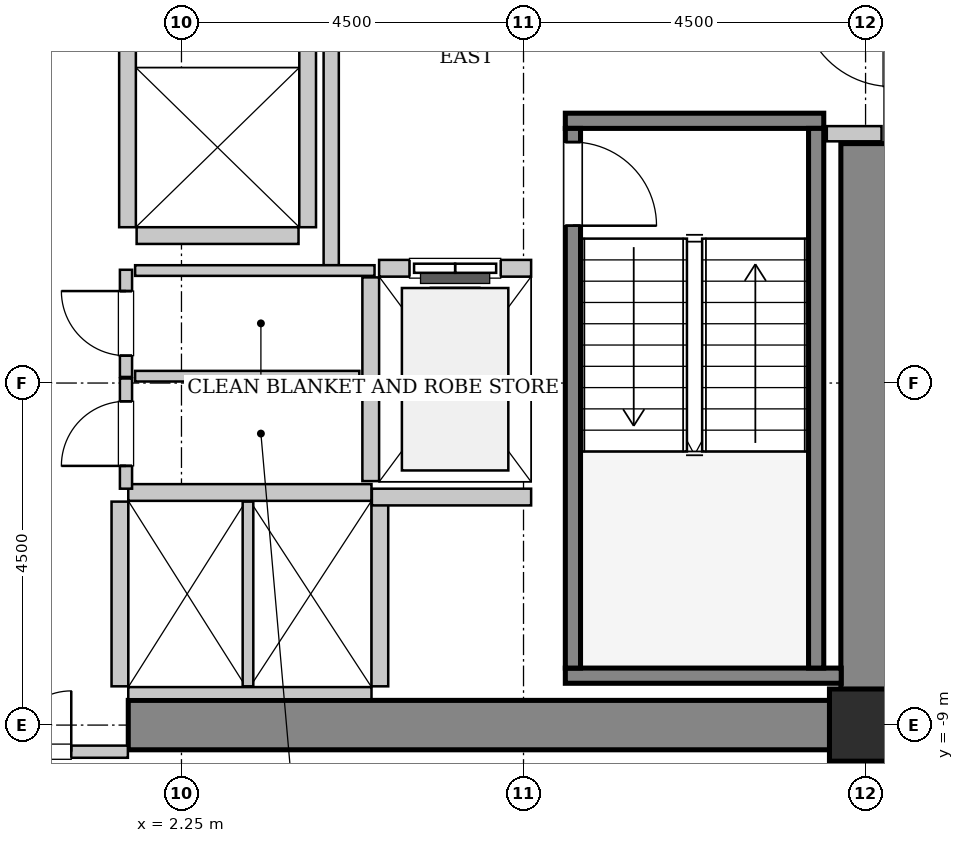
"""IFC4 building model, lengths in metres.
Left out: names, types, materials, properties, quantities, classifications, styles, units other than length and angle.
Written with IfcOpenShell. Run it as: python <this file> out.ifc"""

import sys

from ifc_helpers import new_model, si_unit, direction, frame, frame_2d, origin, origin_2d, place, context, subcontext, project, spatial, rectangle, hollow_rectangle, extrude, source, transform, mapped, element, fill, save


model = new_model("IFC4")
c1 = context("Model", 3, precision=1e-05, world=origin(), true_north=direction((0.0, 1.0)))
c2 = subcontext(c1, "Body", "Model", "MODEL_VIEW")
j1 = project(units=[si_unit("LENGTHUNIT", "METRE"), si_unit("PLANEANGLEUNIT", "RADIAN")], contexts=[c1])
p1 = place(None, origin())
s1 = spatial("IfcSite", under=j1, at=p1, CompositionType="ELEMENT")
p2 = place(p1, origin())
s2 = spatial("IfcBuilding", under=s1, at=p2, CompositionType="ELEMENT")
p3 = place(p2, frame((0.0, 0.0, 74.8)))
s3 = spatial("IfcBuildingStorey", under=s2, at=p3, CompositionType="ELEMENT", Elevation=74.8)
m1 = source(origin(), c2, "Body", "SweptSolid", [
    extrude(rectangle(XDim=10.025, YDim=0.65, at=frame_2d((5.012, 0.0))), origin(), (0.0, 0.0, 1.0), 3.8),
])
p4 = place(p3, frame((1.55, -9.0, 0.0), z_axis=(0.0, 0.0, 1.0), x_axis=(1.0, 0.0, 0.0)))
e1 = element("IfcWall", 1, at=p4, inside=s3, PredefinedType="SHEAR", context=c2, shape_type="MappedRepresentation", body=[
    mapped(m1, transform((0.0, 0.0, 0.0), x_axis=(1.0, 0.0, 0.0), y_axis=(0.0, 1.0, 0.0), z_axis=(0.0, 0.0, 1.0), scale=1.0)),
])
m2 = source(origin(), c2, "Body", "SweptSolid", [
    extrude(rectangle(XDim=7.325, YDim=0.65, at=frame_2d((3.663, 0.0))), origin(), (0.0, 0.0, 1.0), 3.8),
])
p5 = place(p3, frame((11.25, -8.675, 0.0), z_axis=(0.0, 0.0, 1.0), x_axis=(0.0, 1.0, 0.0)))
e2 = element("IfcWall", 2, at=p5, inside=s3, PredefinedType="SHEAR", context=c2, shape_type="MappedRepresentation", body=[
    mapped(m2, transform((0.0, 0.0, 0.0), x_axis=(1.0, 0.0, 0.0), y_axis=(0.0, 1.0, 0.0), z_axis=(0.0, 0.0, 1.0), scale=1.0)),
])
m3 = source(origin(), c2, "Body", "SweptSolid", [
    extrude(hollow_rectangle(XDim=0.95, YDim=0.95, WallThickness=0.045, InnerFilletRadius=0.045, OuterFilletRadius=0.09, at=origin_2d()), origin(), (0.0, 0.0, 1.0), 3.8),
])
p6 = place(p3, frame((11.25, -9.0, 0.0), z_axis=(0.0, 0.0, 1.0), x_axis=(1.0, 0.0, 0.0)))
e3 = element("IfcColumn", 3, at=p6, inside=s3, PredefinedType="COLUMN", context=c2, shape_type="MappedRepresentation", body=[
    mapped(m3, transform((0.0, 0.0, 0.0), x_axis=(1.0, 0.0, 0.0), y_axis=(0.0, 1.0, 0.0), z_axis=(0.0, 0.0, 1.0), scale=1.0)),
])
m4 = source(origin(), c2, "Body", "SweptSolid", [
    extrude(rectangle(XDim=3.4, YDim=0.2, at=frame_2d((1.7, 0.0))), origin(), (0.0, 0.0, 1.0), 3.8),
])
p7 = place(p3, frame((7.3, -1.05, 0.0), z_axis=(0.0, 0.0, 1.0), x_axis=(1.0, 0.0, 0.0)))
e4 = element("IfcWall", 4, at=p7, inside=s3, PredefinedType="SOLIDWALL", context=c2, shape_type="MappedRepresentation", body=[
    mapped(m4, transform((0.0, 0.0, 0.0), x_axis=(1.0, 0.0, 0.0), y_axis=(0.0, 1.0, 0.0), z_axis=(0.0, 0.0, 1.0), scale=1.0)),
])
m5 = source(origin(), c2, "Body", "SweptSolid", [
    extrude(rectangle(XDim=3.63, YDim=0.2, at=frame_2d((1.815, 0.0))), origin(), (0.0, 0.0, 1.0), 3.8),
])
p8 = place(p3, frame((7.3, -8.35, 0.0), z_axis=(0.0, 0.0, 1.0), x_axis=(1.0, 0.0, 0.0)))
e5 = element("IfcWall", 5, at=p8, inside=s3, PredefinedType="SOLIDWALL", context=c2, shape_type="MappedRepresentation", body=[
    mapped(m5, transform((0.0, 0.0, 0.0), x_axis=(1.0, 0.0, 0.0), y_axis=(0.0, 1.0, 0.0), z_axis=(0.0, 0.0, 1.0), scale=1.0)),
])
m6 = source(origin(), c2, "Body", "SweptSolid", [
    extrude(rectangle(XDim=7.1, YDim=0.2, at=frame_2d((3.55, 0.0))), origin(), (0.0, 0.0, 1.0), 3.8),
])
p9 = place(p3, frame((7.4, -1.15, 0.0), z_axis=(0.0, 0.0, 1.0), x_axis=(0.0, -1.0, 0.0)))
e6 = element("IfcWall", 6, at=p9, inside=s3, PredefinedType="SOLIDWALL", context=c2, shape_type="MappedRepresentation", body=[
    mapped(m6, transform((0.0, 0.0, 0.0), x_axis=(1.0, 0.0, 0.0), y_axis=(0.0, 1.0, 0.0), z_axis=(0.0, 0.0, 1.0), scale=1.0)),
])
p10 = place(p9, frame((0.18, 0.0, 0.0)))
e7 = element("IfcOpeningElement", 7, at=p10, cuts=e6, PredefinedType="OPENING", context=c2, shape_type="SweptSolid", body=[
    extrude(rectangle(XDim=1.1, YDim=2.15, at=frame_2d((0.55, 1.075))), frame((0.0, 0.11, 0.0), z_axis=(0.0, -1.0, 0.0), x_axis=(1.0, 0.0, 0.0)), (0.0, 0.0, 1.0), 0.22),
])
p11 = place(p3, frame((10.6, -1.15, 0.0), z_axis=(0.0, 0.0, 1.0), x_axis=(0.0, -1.0, 0.0)))
e8 = element("IfcWall", 8, at=p11, inside=s3, PredefinedType="SOLIDWALL", context=c2, shape_type="MappedRepresentation", body=[
    mapped(m6, transform((0.0, 0.0, 0.0), x_axis=(1.0, 0.0, 0.0), y_axis=(0.0, 1.0, 0.0), z_axis=(0.0, 0.0, 1.0), scale=1.0)),
])
m7 = source(origin(), c2, "Body", "SweptSolid", [
    extrude(rectangle(XDim=2.0, YDim=0.22, at=frame_2d((1.0, 0.0))), origin(), (0.0, 0.0, 1.0), 3.535),
])
p12 = place(p3, frame((6.85, -2.99, 0.0), z_axis=(0.0, 0.0, 1.0), x_axis=(-1.0, 0.0, 0.0)))
e9 = element("IfcWall", 9, at=p12, inside=s3, PredefinedType="SOLIDWALL", context=c2, shape_type="MappedRepresentation", body=[
    mapped(m7, transform((0.0, 0.0, 0.0), x_axis=(1.0, 0.0, 0.0), y_axis=(0.0, 1.0, 0.0), z_axis=(0.0, 0.0, 1.0), scale=1.0)),
])
p13 = place(p12, frame((0.4, 0.0, 0.0)))
e10 = element("IfcOpeningElement", 10, at=p13, cuts=e9, PredefinedType="OPENING", context=c2, shape_type="SweptSolid", body=[
    extrude(rectangle(XDim=1.2, YDim=2.2, at=frame_2d((0.6, 1.1))), frame((0.0, 0.12, 0.0), z_axis=(0.0, -1.0, 0.0), x_axis=(1.0, 0.0, 0.0)), (0.0, 0.0, 1.0), 0.24),
])
m8 = source(origin(), c2, "Body", "SweptSolid", [
    extrude(rectangle(XDim=2.68, YDim=0.22, at=frame_2d((1.34, 0.0))), origin(), (0.0, 0.0, 1.0), 3.535),
])
p14 = place(p3, frame((4.74, -3.11, 0.0), z_axis=(0.0, 0.0, 1.0), x_axis=(0.0, -1.0, 0.0)))
e11 = element("IfcWall", 11, at=p14, inside=s3, PredefinedType="SOLIDWALL", context=c2, shape_type="MappedRepresentation", body=[
    mapped(m8, transform((0.0, 0.0, 0.0), x_axis=(1.0, 0.0, 0.0), y_axis=(0.0, 1.0, 0.0), z_axis=(0.0, 0.0, 1.0), scale=1.0)),
])
m9 = source(origin(), c2, "Body", "SweptSolid", [
    extrude(rectangle(XDim=3.2, YDim=0.22, at=frame_2d((1.6, 0.0))), origin(), (0.0, 0.0, 1.0), 3.535),
])
p15 = place(p3, frame((4.75, -5.94, 0.0), z_axis=(0.0, 0.0, 1.0), x_axis=(-1.0, 0.0, 0.0)))
e12 = element("IfcWall", 12, at=p15, inside=s3, PredefinedType="SOLIDWALL", context=c2, shape_type="MappedRepresentation", body=[
    mapped(m9, transform((0.0, 0.0, 0.0), x_axis=(1.0, 0.0, 0.0), y_axis=(0.0, 1.0, 0.0), z_axis=(0.0, 0.0, 1.0), scale=1.0)),
])
m10 = source(origin(), c2, "Body", "SweptSolid", [
    extrude(rectangle(XDim=3.2, YDim=0.16, at=frame_2d((1.6, 0.0))), origin(), (0.0, 0.0, 1.0), 2.425),
])
p16 = place(p3, frame((1.55, -8.58, 0.0), z_axis=(0.0, 0.0, 1.0), x_axis=(1.0, 0.0, 0.0)))
e13 = element("IfcWall", 13, at=p16, inside=s3, PredefinedType="PARTITIONING", context=c2, shape_type="MappedRepresentation", body=[
    mapped(m10, transform((0.0, 0.0, 0.0), x_axis=(1.0, 0.0, 0.0), y_axis=(0.0, 1.0, 0.0), z_axis=(0.0, 0.0, 1.0), scale=1.0)),
])
m11 = source(origin(), c2, "Body", "SweptSolid", [
    extrude(rectangle(XDim=2.43, YDim=0.22, at=frame_2d((1.215, 0.0))), origin(), (0.0, 0.0, 1.0), 3.535),
])
p17 = place(p3, frame((1.44, -6.06, 0.0), z_axis=(0.0, 0.0, 1.0), x_axis=(0.0, -1.0, 0.0)))
e14 = element("IfcWall", 14, at=p17, inside=s3, PredefinedType="SOLIDWALL", context=c2, shape_type="MappedRepresentation", body=[
    mapped(m11, transform((0.0, 0.0, 0.0), x_axis=(1.0, 0.0, 0.0), y_axis=(0.0, 1.0, 0.0), z_axis=(0.0, 0.0, 1.0), scale=1.0)),
])
m12 = source(origin(), c2, "Body", "SweptSolid", [
    extrude(rectangle(XDim=2.43, YDim=0.14, at=frame_2d((1.215, 0.0))), origin(), (0.0, 0.0, 1.0), 3.535),
])
p18 = place(p3, frame((3.125, -8.49, 0.0), z_axis=(0.0, 0.0, 1.0), x_axis=(0.0, 1.0, 0.0)))
e15 = element("IfcWall", 15, at=p18, inside=s3, PredefinedType="PARTITIONING", context=c2, shape_type="MappedRepresentation", body=[
    mapped(m12, transform((0.0, 0.0, 0.0), x_axis=(1.0, 0.0, 0.0), y_axis=(0.0, 1.0, 0.0), z_axis=(0.0, 0.0, 1.0), scale=1.0)),
])
p19 = place(p3, frame((4.86, -8.49, 0.0), z_axis=(0.0, 0.0, 1.0), x_axis=(0.0, 1.0, 0.0)))
e16 = element("IfcWall", 16, at=p19, inside=s3, PredefinedType="SOLIDWALL", context=c2, shape_type="MappedRepresentation", body=[
    mapped(m11, transform((0.0, 0.0, 0.0), x_axis=(1.0, 0.0, 0.0), y_axis=(0.0, 1.0, 0.0), z_axis=(0.0, 0.0, 1.0), scale=1.0)),
])
m13 = source(origin(), c2, "Body", "SweptSolid", [
    extrude(rectangle(XDim=4.9, YDim=0.22, at=frame_2d((2.45, 0.0))), origin(), (0.0, 0.0, 1.0), 3.535),
])
for number, where, z_axis, x_axis in (
    (17, (1.54, 2.45, 0.0), (0.0, 0.0, 1.0), (0.0, -1.0, 0.0)),
    (18, (3.91, -2.45, 0.0), (0.0, 0.0, 1.0), (0.0, 1.0, 0.0)),
):
    element("IfcWall", number, at=place(p3, frame(where, z_axis=z_axis, x_axis=x_axis)), inside=s3, PredefinedType="SOLIDWALL", context=c2, shape_type="MappedRepresentation", body=[
        mapped(m13, transform((0.0, 0.0, 0.0), x_axis=(1.0, 0.0, 0.0), y_axis=(0.0, 1.0, 0.0), z_axis=(0.0, 0.0, 1.0), scale=1.0)),
    ])
m14 = source(origin(), c2, "Body", "SweptSolid", [
    extrude(rectangle(XDim=2.13, YDim=0.22, at=frame_2d((1.065, 0.0))), origin(), (0.0, 0.0, 1.0), 3.535),
])
p20 = place(p3, frame((1.66, -2.56, 0.0), z_axis=(0.0, 0.0, 1.0), x_axis=(1.0, 0.0, 0.0)))
e19 = element("IfcWall", 19, at=p20, inside=s3, PredefinedType="SOLIDWALL", context=c2, shape_type="MappedRepresentation", body=[
    mapped(m14, transform((0.0, 0.0, 0.0), x_axis=(1.0, 0.0, 0.0), y_axis=(0.0, 1.0, 0.0), z_axis=(0.0, 0.0, 1.0), scale=1.0)),
])
m15 = source(origin(), c2, "Body", "SweptSolid", [
    extrude(rectangle(XDim=2.095, YDim=0.22, at=frame_2d((1.048, 0.0))), origin(), (0.0, 0.0, 1.0), 3.535),
])
p21 = place(p3, frame((4.755, -6.0, 0.0), z_axis=(0.0, 0.0, 1.0), x_axis=(1.0, 0.0, 0.0)))
e20 = element("IfcWall", 20, at=p21, inside=s3, PredefinedType="SOLIDWALL", context=c2, shape_type="MappedRepresentation", body=[
    mapped(m15, transform((0.0, 0.0, 0.0), x_axis=(1.0, 0.0, 0.0), y_axis=(0.0, 1.0, 0.0), z_axis=(0.0, 0.0, 1.0), scale=1.0)),
])
m16 = source(origin(), c2, "Body", "SweptSolid", [
    extrude(rectangle(XDim=5.9, YDim=0.2, at=frame_2d((2.95, 0.0))), origin(), (0.0, 0.0, 1.0), 3.535),
])
p22 = place(p3, frame((4.22, -2.95, 0.0), z_axis=(0.0, 0.0, 1.0), x_axis=(0.0, 1.0, 0.0)))
e21 = element("IfcWall", 21, at=p22, inside=s3, PredefinedType="PARTITIONING", context=c2, shape_type="MappedRepresentation", body=[
    mapped(m16, transform((0.0, 0.0, 0.0), x_axis=(1.0, 0.0, 0.0), y_axis=(0.0, 1.0, 0.0), z_axis=(0.0, 0.0, 1.0), scale=1.0)),
])
m17 = source(origin(), c2, "Body", "SweptSolid", [
    extrude(rectangle(XDim=0.72, YDim=0.2, at=frame_2d((0.36, 0.0))), origin(), (0.0, 0.0, 1.0), 3.535),
])
p23 = place(p3, frame((10.74, -1.22, 0.0), z_axis=(0.0, 0.0, 1.0), x_axis=(1.0, 0.0, 0.0)))
e22 = element("IfcWall", 22, at=p23, inside=s3, PredefinedType="PARTITIONING", context=c2, shape_type="MappedRepresentation", body=[
    mapped(m17, transform((0.0, 0.0, 0.0), x_axis=(1.0, 0.0, 0.0), y_axis=(0.0, 1.0, 0.0), z_axis=(0.0, 0.0, 1.0), scale=1.0)),
])
m18 = source(origin(), c2, "Body", "SweptSolid", [
    extrude(rectangle(XDim=3.09, YDim=0.16, at=frame_2d((1.545, 0.0))), origin(), (0.0, 0.0, 1.0), 2.425),
])
p24 = place(p3, frame((-1.545, -9.35, 0.0), z_axis=(0.0, 0.0, 1.0), x_axis=(1.0, 0.0, 0.0)))
e23 = element("IfcWall", 23, at=p24, inside=s3, PredefinedType="PARTITIONING", context=c2, shape_type="MappedRepresentation", body=[
    mapped(m18, transform((0.0, 0.0, 0.0), x_axis=(1.0, 0.0, 0.0), y_axis=(0.0, 1.0, 0.0), z_axis=(0.0, 0.0, 1.0), scale=1.0)),
])
p25 = place(p24, frame((0.745, 0.0, 0.0)))
e24 = element("IfcOpeningElement", 24, at=p25, cuts=e23, PredefinedType="OPENING", context=c2, shape_type="SweptSolid", body=[
    extrude(rectangle(XDim=1.6, YDim=2.3, at=frame_2d((0.8, 1.15))), frame((0.0, 0.09, 0.0), z_axis=(0.0, -1.0, 0.0), x_axis=(1.0, 0.0, 0.0)), (0.0, 0.0, 1.0), 0.18),
])
m19 = source(origin(), c2, "Body", "SweptSolid", [
    extrude(rectangle(XDim=1.41, YDim=0.16, at=frame_2d((0.705, 0.0))), origin(), (0.0, 0.0, 1.0), 3.535),
])
p26 = place(p3, frame((1.52, -4.42, 0.0), z_axis=(0.0, 0.0, 1.0), x_axis=(0.0, 1.0, 0.0)))
e25 = element("IfcWall", 25, at=p26, inside=s3, PredefinedType="PARTITIONING", context=c2, shape_type="MappedRepresentation", body=[
    mapped(m19, transform((0.0, 0.0, 0.0), x_axis=(1.0, 0.0, 0.0), y_axis=(0.0, 1.0, 0.0), z_axis=(0.0, 0.0, 1.0), scale=1.0)),
])
p27 = place(p26, frame((0.28, 0.0, 0.0)))
e26 = element("IfcOpeningElement", 26, at=p27, cuts=e25, PredefinedType="OPENING", context=c2, shape_type="SweptSolid", body=[
    extrude(rectangle(XDim=0.85, YDim=2.1, at=frame_2d((0.425, 1.05))), frame((0.0, 0.09, 0.0), z_axis=(0.0, -1.0, 0.0), x_axis=(1.0, 0.0, 0.0)), (0.0, 0.0, 1.0), 0.18),
])
m20 = source(origin(), c2, "Body", "SweptSolid", [
    extrude(rectangle(XDim=3.15, YDim=0.14, at=frame_2d((1.575, 0.0))), origin(), (0.0, 0.0, 1.0), 3.535),
])
p28 = place(p3, frame((1.64, -3.02, 0.0), z_axis=(0.0, 0.0, 1.0), x_axis=(1.0, 0.0, 0.0)))
e27 = element("IfcWall", 27, at=p28, inside=s3, PredefinedType="PARTITIONING", context=c2, shape_type="MappedRepresentation", body=[
    mapped(m20, transform((0.0, 0.0, 0.0), x_axis=(1.0, 0.0, 0.0), y_axis=(0.0, 1.0, 0.0), z_axis=(0.0, 0.0, 1.0), scale=1.0)),
])
m21 = source(origin(), c2, "Body", "SweptSolid", [
    extrude(rectangle(XDim=2.95, YDim=0.14, at=frame_2d((1.475, 0.0))), origin(), (0.0, 0.0, 1.0), 3.535),
])
p29 = place(p3, frame((1.64, -4.41, 0.0), z_axis=(0.0, 0.0, 1.0), x_axis=(1.0, 0.0, 0.0)))
e28 = element("IfcWall", 28, at=p29, inside=s3, PredefinedType="PARTITIONING", context=c2, shape_type="MappedRepresentation", body=[
    mapped(m21, transform((0.0, 0.0, 0.0), x_axis=(1.0, 0.0, 0.0), y_axis=(0.0, 1.0, 0.0), z_axis=(0.0, 0.0, 1.0), scale=1.0)),
])
m22 = source(origin(), c2, "Body", "SweptSolid", [
    extrude(rectangle(XDim=1.45, YDim=0.16, at=frame_2d((0.725, 0.0))), origin(), (0.0, 0.0, 1.0), 3.535),
])
p30 = place(p3, frame((1.52, -5.89, 0.0), z_axis=(0.0, 0.0, 1.0), x_axis=(0.0, 1.0, 0.0)))
e29 = element("IfcWall", 29, at=p30, inside=s3, PredefinedType="PARTITIONING", context=c2, shape_type="MappedRepresentation", body=[
    mapped(m22, transform((0.0, 0.0, 0.0), x_axis=(1.0, 0.0, 0.0), y_axis=(0.0, 1.0, 0.0), z_axis=(0.0, 0.0, 1.0), scale=1.0)),
])
p31 = place(p30, frame((0.3, 0.0, 0.0)))
e30 = element("IfcOpeningElement", 30, at=p31, cuts=e29, PredefinedType="OPENING", context=c2, shape_type="SweptSolid", body=[
    extrude(rectangle(XDim=0.85, YDim=2.1, at=frame_2d((0.425, 1.05))), frame((0.0, 0.09, 0.0), z_axis=(0.0, -1.0, 0.0), x_axis=(1.0, 0.0, 0.0)), (0.0, 0.0, 1.0), 0.18),
])
m23 = source(origin(), c2, "Body", "SweptSolid", [
    extrude(rectangle(XDim=1.1, YDim=2.15, at=frame_2d((0.55, 1.075))), frame((0.0, 0.025, 0.0), z_axis=(0.0, -1.0, 0.0), x_axis=(1.0, 0.0, 0.0)), (0.0, 0.0, 1.0), 0.05),
])
p32 = place(p10, origin())
e31 = element("IfcDoor", 31, at=p32, inside=s3, OperationType="SINGLE_SWING_RIGHT", PredefinedType="DOOR", context=c2, shape_type="MappedRepresentation", body=[
    mapped(m23, transform((0.0, 0.0, 0.0), x_axis=(1.0, 0.0, 0.0), y_axis=(0.0, 1.0, 0.0), z_axis=(0.0, 0.0, 1.0), scale=1.0)),
])
fill(e7, e31)
m24 = source(origin(), c2, "Body", "SweptSolid", [
    extrude(rectangle(XDim=1.2, YDim=2.2, at=frame_2d((0.6, 1.1))), frame((0.0, 0.025, 0.0), z_axis=(0.0, -1.0, 0.0), x_axis=(1.0, 0.0, 0.0)), (0.0, 0.0, 1.0), 0.05),
])
p33 = place(p13, origin())
e32 = element("IfcDoor", 32, at=p33, inside=s3, OperationType="SLIDING_TO_LEFT", PredefinedType="DOOR", context=c2, shape_type="MappedRepresentation", body=[
    mapped(m24, transform((0.0, 0.0, 0.0), x_axis=(1.0, 0.0, 0.0), y_axis=(0.0, 1.0, 0.0), z_axis=(0.0, 0.0, 1.0), scale=1.0)),
])
fill(e10, e32)
m25 = source(origin(), c2, "Body", "SweptSolid", [
    extrude(rectangle(XDim=1.6, YDim=2.3, at=frame_2d((0.8, 1.15))), frame((0.0, 0.025, 0.0), z_axis=(0.0, -1.0, 0.0), x_axis=(1.0, 0.0, 0.0)), (0.0, 0.0, 1.0), 0.05),
])
p34 = place(p25, origin())
e33 = element("IfcDoor", 33, at=p34, inside=s3, OperationType="DOUBLE_DOOR_SINGLE_SWING", PredefinedType="DOOR", context=c2, shape_type="MappedRepresentation", body=[
    mapped(m25, transform((0.0, 0.0, 0.0), x_axis=(1.0, 0.0, 0.0), y_axis=(0.0, 1.0, 0.0), z_axis=(0.0, 0.0, 1.0), scale=1.0)),
])
fill(e24, e33)
m26 = source(origin(), c2, "Body", "SweptSolid", [
    extrude(rectangle(XDim=0.85, YDim=2.1, at=frame_2d((0.425, 1.05))), frame((0.0, 0.025, 0.0), z_axis=(0.0, -1.0, 0.0), x_axis=(1.0, 0.0, 0.0)), (0.0, 0.0, 1.0), 0.05),
])
p35 = place(p27, origin())
e34 = element("IfcDoor", 34, at=p35, inside=s3, OperationType="SINGLE_SWING_RIGHT", PredefinedType="DOOR", context=c2, shape_type="MappedRepresentation", body=[
    mapped(m26, transform((0.0, 0.0, 0.0), x_axis=(1.0, 0.0, 0.0), y_axis=(0.0, 1.0, 0.0), z_axis=(0.0, 0.0, 1.0), scale=1.0)),
])
fill(e26, e34)
p36 = place(p31, origin())
e35 = element("IfcDoor", 35, at=p36, inside=s3, OperationType="SINGLE_SWING_LEFT", PredefinedType="DOOR", context=c2, shape_type="MappedRepresentation", body=[
    mapped(m26, transform((0.0, 0.0, 0.0), x_axis=(1.0, 0.0, 0.0), y_axis=(0.0, 1.0, 0.0), z_axis=(0.0, 0.0, 1.0), scale=1.0)),
])
fill(e30, e35)
save(model, sys.argv[1])
